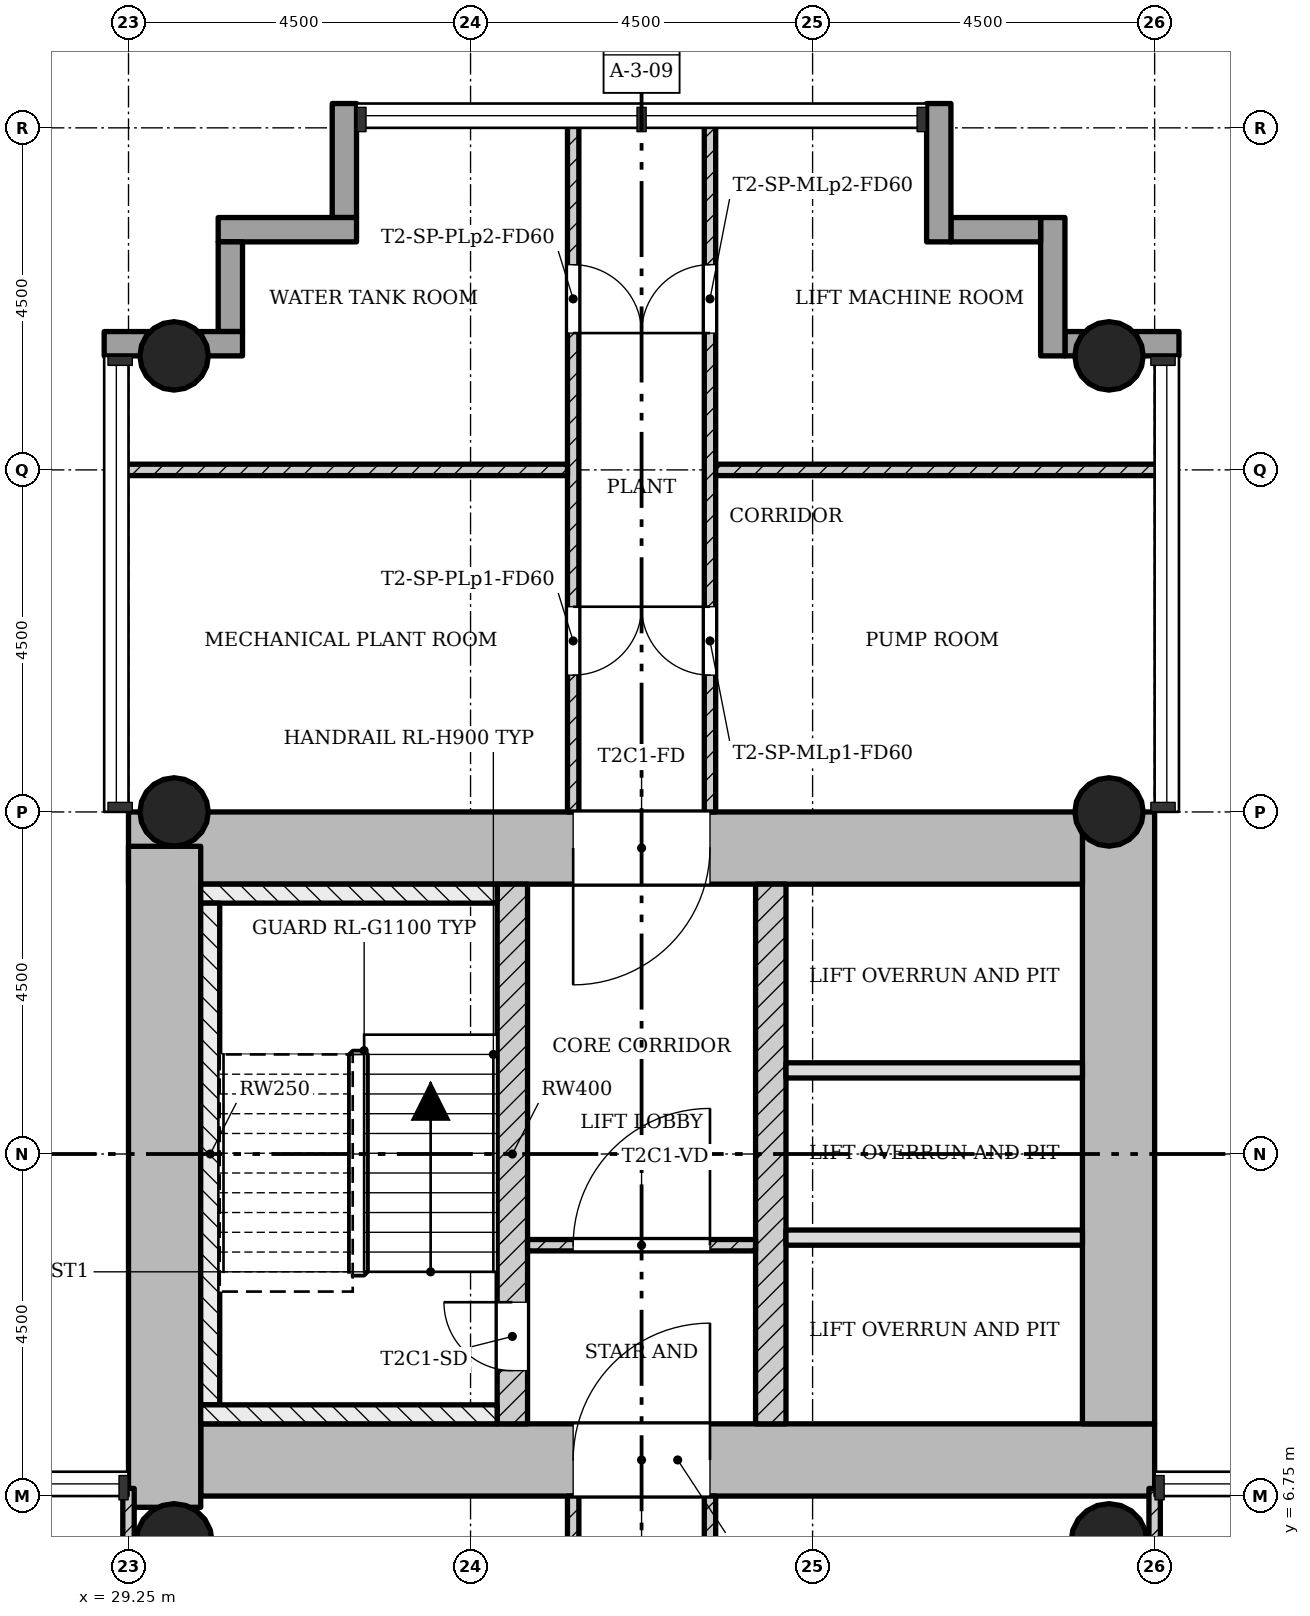
"""IFC4 building model, lengths in metres.
Left out: names, types, materials, properties, quantities, classifications, styles, units other than length and angle.
Written with IfcOpenShell. Run it as: python <this file> out.ifc"""

import sys

from ifc_helpers import new_model, si_unit, direction, frame, frame_2d, origin, origin_2d, place, context, subcontext, project, spatial, rectangle, hollow_circle, extrude, element, fill, save


model = new_model("IFC4")
c1 = context("Model", 3, precision=1e-05, world=origin(), true_north=direction((0.0, 1.0)))
c2 = subcontext(c1, "Body", "Model", "MODEL_VIEW")
j1 = project(units=[si_unit("LENGTHUNIT", "METRE"), si_unit("PLANEANGLEUNIT", "RADIAN")], contexts=[c1])
p1 = place(None, origin())
s1 = spatial("IfcSite", under=j1, at=p1, CompositionType="ELEMENT")
p2 = place(p1, origin())
s2 = spatial("IfcBuilding", under=s1, at=p2, CompositionType="ELEMENT")
p3 = place(p2, frame((0.0, 0.0, 124.2)))
s3 = spatial("IfcBuildingStorey", under=s2, at=p3, CompositionType="ELEMENT", Elevation=124.2)
p4 = place(p3, frame((30.2, 7.225, 0.0), z_axis=(0.0, 0.0, 1.0), x_axis=(1.0, 0.0, 0.0)))
e1 = element("IfcWall", 1, at=p4, inside=s3, PredefinedType="SHEAR", context=c2, shape_type="SweptSolid", body=[
    extrude(rectangle(XDim=12.55, YDim=0.95, at=frame_2d((6.275, 0.0))), origin(), (0.0, 0.0, 1.0), 4.5),
])
p5 = place(p4, frame((4.9, 0.0, 0.0)))
e2 = element("IfcOpeningElement", 2, at=p5, cuts=e1, PredefinedType="OPENING", context=c2, shape_type="SweptSolid", body=[
    extrude(rectangle(XDim=1.8, YDim=2.1, at=frame_2d((0.9, 1.05))), frame((0.0, 0.485, 0.0), z_axis=(0.0, -1.0, 0.0), x_axis=(1.0, 0.0, 0.0)), (0.0, 0.0, 1.0), 0.97),
])
p6 = place(p3, frame((42.275, 7.7, 0.0), z_axis=(0.0, 0.0, 1.0), x_axis=(0.0, 1.0, 0.0)))
e3 = element("IfcWall", 3, at=p6, inside=s3, PredefinedType="SHEAR", context=c2, shape_type="SweptSolid", body=[
    extrude(rectangle(XDim=8.05, YDim=0.95, at=frame_2d((4.025, 0.0))), origin(), (0.0, 0.0, 1.0), 4.5),
])
p7 = place(p3, frame((41.8, 15.275, 0.0), z_axis=(0.0, 0.0, 1.0), x_axis=(-1.0, 0.0, 0.0)))
e4 = element("IfcWall", 4, at=p7, inside=s3, PredefinedType="SHEAR", context=c2, shape_type="SweptSolid", body=[
    extrude(rectangle(XDim=12.55, YDim=0.95, at=frame_2d((6.275, 0.0))), origin(), (0.0, 0.0, 1.0), 4.5),
])
p8 = place(p7, frame((4.9, 0.0, 0.0)))
e5 = element("IfcOpeningElement", 5, at=p8, cuts=e4, PredefinedType="OPENING", context=c2, shape_type="SweptSolid", body=[
    extrude(rectangle(XDim=1.8, YDim=2.1, at=frame_2d((0.9, 1.05))), frame((0.0, 0.485, 0.0), z_axis=(0.0, -1.0, 0.0), x_axis=(1.0, 0.0, 0.0)), (0.0, 0.0, 1.0), 0.97),
])
p9 = place(p3, frame((29.725, 15.298, 0.0), z_axis=(0.0, 0.0, 1.0), x_axis=(0.0, -1.0, 0.0)))
e6 = element("IfcWall", 6, at=p9, inside=s3, PredefinedType="SHEAR", context=c2, shape_type="SweptSolid", body=[
    extrude(rectangle(XDim=8.696, YDim=0.95, at=frame_2d((4.348, 0.0))), origin(), (0.0, 0.0, 1.0), 4.5),
])
p10 = place(p3, frame((34.3, 7.7, 0.0), z_axis=(0.0, 0.0, 1.0), x_axis=(0.0, 1.0, 0.0)))
e7 = element("IfcWall", 7, at=p10, inside=s3, PredefinedType="SHEAR", context=c2, shape_type="SweptSolid", body=[
    extrude(rectangle(XDim=7.1, YDim=0.4, at=frame_2d((3.55, 0.0))), origin(), (0.0, 0.0, 1.0), 4.5),
])
p11 = place(p10, frame((0.7, 0.0, 0.0)))
e8 = element("IfcOpeningElement", 8, at=p11, cuts=e7, PredefinedType="OPENING", context=c2, shape_type="SweptSolid", body=[
    extrude(rectangle(XDim=0.9, YDim=2.1, at=frame_2d((0.45, 1.05))), frame((0.0, 0.21, 0.0), z_axis=(0.0, -1.0, 0.0), x_axis=(1.0, 0.0, 0.0)), (0.0, 0.0, 1.0), 0.42),
])
p12 = place(p3, frame((37.7, 7.7, 0.0), z_axis=(0.0, 0.0, 1.0), x_axis=(0.0, 1.0, 0.0)))
e9 = element("IfcWall", 9, at=p12, inside=s3, PredefinedType="SHEAR", context=c2, shape_type="SweptSolid", body=[
    extrude(rectangle(XDim=7.1, YDim=0.4, at=frame_2d((3.55, 0.0))), origin(), (0.0, 0.0, 1.0), 4.5),
])
for number, where, z_axis, x_axis in (
    (10, (42.15, 15.75, 0.0), (0.0, 0.0, 1.0), (1.0, 0.0, 0.0)),
    (11, (29.85, 15.75, 0.0), (0.0, 0.0, 1.0), (1.0, 0.0, 0.0)),
    (12, (42.15, 21.75, 0.0), (0.0, 0.0, 1.0), (1.0, 0.0, 0.0)),
    (13, (29.85, 21.75, 0.0), (0.0, 0.0, 1.0), (1.0, 0.0, 0.0)),
):
    element("IfcColumn", number, at=place(p3, frame(where, z_axis=z_axis, x_axis=x_axis)), inside=s3, PredefinedType="COLUMN", context=c2, shape_type="SweptSolid", body=[
        extrude(hollow_circle(Radius=0.45, WallThickness=0.032, at=origin_2d()), origin(), (0.0, 0.0, 1.0), 4.5),
    ])
for number, where, z_axis, x_axis in (
    (14, (42.15, 6.15, 0.0), (0.0, 0.0, 1.0), (1.0, 0.0, 0.0)),
    (15, (29.85, 6.15, 0.0), (0.0, 0.0, 1.0), (1.0, 0.0, 0.0)),
):
    element("IfcColumn", number, at=place(p3, frame(where, z_axis=z_axis, x_axis=x_axis)), inside=s3, PredefinedType="COLUMN", context=c2, shape_type="SweptSolid", body=[
        extrude(hollow_circle(Radius=0.5, WallThickness=0.036, at=origin_2d()), origin(), (0.0, 0.0, 1.0), 4.5),
    ])
p13 = place(p3, frame((43.07, 21.91, -0.3), z_axis=(0.0, 0.0, 1.0), x_axis=(-1.0, 0.0, 0.0)))
e16 = element("IfcWall", 16, at=p13, inside=s3, PredefinedType="STANDARD", context=c2, shape_type="SweptSolid", body=[
    extrude(rectangle(XDim=1.5, YDim=0.32, at=frame_2d((0.75, 0.0))), origin(), (0.0, 0.0, 1.0), 4.5),
])
p14 = place(p3, frame((41.41, 21.75, -0.3), z_axis=(0.0, 0.0, 1.0), x_axis=(0.0, 1.0, 0.0)))
e17 = element("IfcWall", 17, at=p14, inside=s3, PredefinedType="STANDARD", context=c2, shape_type="SweptSolid", body=[
    extrude(rectangle(XDim=1.82, YDim=0.32, at=frame_2d((0.91, 0.0))), origin(), (0.0, 0.0, 1.0), 4.5),
])
p15 = place(p3, frame((41.25, 23.41, -0.3), z_axis=(0.0, 0.0, 1.0), x_axis=(-1.0, 0.0, 0.0)))
e18 = element("IfcWall", 18, at=p15, inside=s3, PredefinedType="STANDARD", context=c2, shape_type="SweptSolid", body=[
    extrude(rectangle(XDim=1.18, YDim=0.32, at=frame_2d((0.59, 0.0))), origin(), (0.0, 0.0, 1.0), 4.5),
])
p16 = place(p3, frame((39.91, 23.25, -0.3), z_axis=(0.0, 0.0, 1.0), x_axis=(0.0, 1.0, 0.0)))
e19 = element("IfcWall", 19, at=p16, inside=s3, PredefinedType="STANDARD", context=c2, shape_type="SweptSolid", body=[
    extrude(rectangle(XDim=1.82, YDim=0.32, at=frame_2d((0.91, 0.0))), origin(), (0.0, 0.0, 1.0), 4.5),
])
p17 = place(p3, frame((32.09, 25.07, -0.3), z_axis=(0.0, 0.0, 1.0), x_axis=(0.0, -1.0, 0.0)))
e20 = element("IfcWall", 20, at=p17, inside=s3, PredefinedType="STANDARD", context=c2, shape_type="SweptSolid", body=[
    extrude(rectangle(XDim=1.5, YDim=0.32, at=frame_2d((0.75, 0.0))), origin(), (0.0, 0.0, 1.0), 4.5),
])
p18 = place(p3, frame((32.25, 23.41, -0.3), z_axis=(0.0, 0.0, 1.0), x_axis=(-1.0, 0.0, 0.0)))
e21 = element("IfcWall", 21, at=p18, inside=s3, PredefinedType="STANDARD", context=c2, shape_type="SweptSolid", body=[
    extrude(rectangle(XDim=1.82, YDim=0.32, at=frame_2d((0.91, 0.0))), origin(), (0.0, 0.0, 1.0), 4.5),
])
p19 = place(p3, frame((30.59, 23.25, -0.3), z_axis=(0.0, 0.0, 1.0), x_axis=(0.0, -1.0, 0.0)))
e22 = element("IfcWall", 22, at=p19, inside=s3, PredefinedType="STANDARD", context=c2, shape_type="SweptSolid", body=[
    extrude(rectangle(XDim=1.18, YDim=0.32, at=frame_2d((0.59, 0.0))), origin(), (0.0, 0.0, 1.0), 4.5),
])
p20 = place(p3, frame((30.75, 21.91, -0.3), z_axis=(0.0, 0.0, 1.0), x_axis=(-1.0, 0.0, 0.0)))
e23 = element("IfcWall", 23, at=p20, inside=s3, PredefinedType="STANDARD", context=c2, shape_type="SweptSolid", body=[
    extrude(rectangle(XDim=1.82, YDim=0.32, at=frame_2d((0.91, 0.0))), origin(), (0.0, 0.0, 1.0), 4.5),
])
p21 = place(p3, frame((37.5, 10.05, 0.0), z_axis=(0.0, 0.0, 1.0), x_axis=(-1.0, 0.0, 0.0)))
e24 = element("IfcWall", 24, at=p21, inside=s3, PredefinedType="PARTITIONING", context=c2, shape_type="SweptSolid", body=[
    extrude(rectangle(XDim=3.0, YDim=0.15, at=frame_2d((1.5, 0.0))), origin(), (0.0, 0.0, 1.0), 4.1),
])
p22 = place(p21, frame((0.6, 0.0, 0.0)))
e25 = element("IfcOpeningElement", 25, at=p22, cuts=e24, PredefinedType="OPENING", context=c2, shape_type="SweptSolid", body=[
    extrude(rectangle(XDim=1.8, YDim=2.1, at=frame_2d((0.9, 1.05))), frame((0.0, 0.085, 0.0), z_axis=(0.0, -1.0, 0.0), x_axis=(1.0, 0.0, 0.0)), (0.0, 0.0, 1.0), 0.17),
])
for number, where, z_axis, x_axis in (
    (26, (41.8, 10.15, 0.0), (0.0, 0.0, 1.0), (-1.0, 0.0, 0.0)),
    (27, (41.8, 12.35, 0.0), (0.0, 0.0, 1.0), (-1.0, 0.0, 0.0)),
):
    element("IfcWall", number, at=place(p3, frame(where, z_axis=z_axis, x_axis=x_axis)), inside=s3, PredefinedType="SOLIDWALL", context=c2, shape_type="SweptSolid", body=[
        extrude(rectangle(XDim=3.9, YDim=0.2, at=frame_2d((1.95, 0.0))), origin(), (0.0, 0.0, 1.0), 4.1),
    ])
p23 = place(p3, frame((35.1, 0.9, 0.0), z_axis=(0.0, 0.0, 1.0), x_axis=(0.0, 1.0, 0.0)))
e28 = element("IfcWall", 28, at=p23, inside=s3, PredefinedType="PARTITIONING", context=c2, shape_type="SweptSolid", body=[
    extrude(rectangle(XDim=5.85, YDim=0.15, at=frame_2d((2.925, 0.0))), origin(), (0.0, 0.0, 1.0), 4.1),
])
p24 = place(p23, frame((2.475, 0.0, 0.0)))
e29 = element("IfcOpeningElement", 29, at=p24, cuts=e28, PredefinedType="OPENING", context=c2, shape_type="SweptSolid", body=[
    extrude(rectangle(XDim=0.9, YDim=2.1, at=frame_2d((0.45, 1.05))), frame((0.0, 0.085, 0.0), z_axis=(0.0, -1.0, 0.0), x_axis=(1.0, 0.0, 0.0)), (0.0, 0.0, 1.0), 0.17),
])
p25 = place(p3, frame((36.9, 0.9, 0.0), z_axis=(0.0, 0.0, 1.0), x_axis=(0.0, 1.0, 0.0)))
e30 = element("IfcWall", 30, at=p25, inside=s3, PredefinedType="PARTITIONING", context=c2, shape_type="SweptSolid", body=[
    extrude(rectangle(XDim=5.85, YDim=0.15, at=frame_2d((2.925, 0.0))), origin(), (0.0, 0.0, 1.0), 4.1),
])
p26 = place(p25, frame((2.475, 0.0, 0.0)))
e31 = element("IfcOpeningElement", 31, at=p26, cuts=e30, PredefinedType="OPENING", context=c2, shape_type="SweptSolid", body=[
    extrude(rectangle(XDim=0.9, YDim=2.1, at=frame_2d((0.45, 1.05))), frame((0.0, 0.085, 0.0), z_axis=(0.0, -1.0, 0.0), x_axis=(1.0, 0.0, 0.0)), (0.0, 0.0, 1.0), 0.17),
])
p27 = place(p3, frame((35.1, 15.75, 0.0), z_axis=(0.0, 0.0, 1.0), x_axis=(0.0, 1.0, 0.0)))
e32 = element("IfcWall", 32, at=p27, inside=s3, PredefinedType="PARTITIONING", context=c2, shape_type="SweptSolid", body=[
    extrude(rectangle(XDim=9.1, YDim=0.15, at=frame_2d((4.55, 0.0))), origin(), (0.0, 0.0, 1.0), 4.1),
])
p28 = place(p27, frame((1.8, 0.0, 0.0)))
e33 = element("IfcOpeningElement", 33, at=p28, cuts=e32, PredefinedType="OPENING", context=c2, shape_type="SweptSolid", body=[
    extrude(rectangle(XDim=0.9, YDim=2.1, at=frame_2d((0.45, 1.05))), frame((0.0, 0.085, 0.0), z_axis=(0.0, -1.0, 0.0), x_axis=(1.0, 0.0, 0.0)), (0.0, 0.0, 1.0), 0.17),
])
p29 = place(p27, frame((6.3, 0.0, 0.0)))
e34 = element("IfcOpeningElement", 34, at=p29, cuts=e32, PredefinedType="OPENING", context=c2, shape_type="SweptSolid", body=[
    extrude(rectangle(XDim=0.9, YDim=2.1, at=frame_2d((0.45, 1.05))), frame((0.0, 0.085, 0.0), z_axis=(0.0, -1.0, 0.0), x_axis=(1.0, 0.0, 0.0)), (0.0, 0.0, 1.0), 0.17),
])
p30 = place(p3, frame((35.025, 20.25, 0.0), z_axis=(0.0, 0.0, 1.0), x_axis=(-1.0, 0.0, 0.0)))
e35 = element("IfcWall", 35, at=p30, inside=s3, PredefinedType="PARTITIONING", context=c2, shape_type="SweptSolid", body=[
    extrude(rectangle(XDim=5.875, YDim=0.15, at=frame_2d((2.938, 0.0))), origin(), (0.0, 0.0, 1.0), 4.1),
])
p31 = place(p3, frame((36.9, 15.75, 0.0), z_axis=(0.0, 0.0, 1.0), x_axis=(0.0, 1.0, 0.0)))
e36 = element("IfcWall", 36, at=p31, inside=s3, PredefinedType="PARTITIONING", context=c2, shape_type="SweptSolid", body=[
    extrude(rectangle(XDim=9.1, YDim=0.15, at=frame_2d((4.55, 0.0))), origin(), (0.0, 0.0, 1.0), 4.1),
])
p32 = place(p31, frame((1.8, 0.0, 0.0)))
e37 = element("IfcOpeningElement", 37, at=p32, cuts=e36, PredefinedType="OPENING", context=c2, shape_type="SweptSolid", body=[
    extrude(rectangle(XDim=0.9, YDim=2.1, at=frame_2d((0.45, 1.05))), frame((0.0, 0.085, 0.0), z_axis=(0.0, -1.0, 0.0), x_axis=(1.0, 0.0, 0.0)), (0.0, 0.0, 1.0), 0.17),
])
p33 = place(p31, frame((6.3, 0.0, 0.0)))
e38 = element("IfcOpeningElement", 38, at=p33, cuts=e36, PredefinedType="OPENING", context=c2, shape_type="SweptSolid", body=[
    extrude(rectangle(XDim=0.9, YDim=2.1, at=frame_2d((0.45, 1.05))), frame((0.0, 0.085, 0.0), z_axis=(0.0, -1.0, 0.0), x_axis=(1.0, 0.0, 0.0)), (0.0, 0.0, 1.0), 0.17),
])
p34 = place(p3, frame((36.975, 20.25, 0.0), z_axis=(0.0, 0.0, 1.0), x_axis=(1.0, 0.0, 0.0)))
e39 = element("IfcWall", 39, at=p34, inside=s3, PredefinedType="PARTITIONING", context=c2, shape_type="SweptSolid", body=[
    extrude(rectangle(XDim=5.875, YDim=0.15, at=frame_2d((2.938, 0.0))), origin(), (0.0, 0.0, 1.0), 4.1),
])
p35 = place(p3, frame((29.25, -6.85, 0.0), z_axis=(0.0, 0.0, 1.0), x_axis=(0.0, 1.0, 0.0)))
e40 = element("IfcWall", 40, at=p35, inside=s3, PredefinedType="PARTITIONING", context=c2, shape_type="SweptSolid", body=[
    extrude(rectangle(XDim=13.7, YDim=0.15, at=frame_2d((6.85, 0.0))), origin(), (0.0, 0.0, 1.0), 4.1),
])
p36 = place(p35, frame((5.95, 0.0, 0.0)))
e41 = element("IfcOpeningElement", 41, at=p36, cuts=e40, PredefinedType="OPENING", context=c2, shape_type="SweptSolid", body=[
    extrude(rectangle(XDim=1.8, YDim=2.1, at=frame_2d((0.9, 1.05))), frame((0.0, 0.085, 0.0), z_axis=(0.0, -1.0, 0.0), x_axis=(1.0, 0.0, 0.0)), (0.0, 0.0, 1.0), 0.17),
])
p37 = place(p3, frame((42.75, -6.85, 0.0), z_axis=(0.0, 0.0, 1.0), x_axis=(0.0, 1.0, 0.0)))
e42 = element("IfcWall", 42, at=p37, inside=s3, PredefinedType="PARTITIONING", context=c2, shape_type="SweptSolid", body=[
    extrude(rectangle(XDim=13.7, YDim=0.15, at=frame_2d((6.85, 0.0))), origin(), (0.0, 0.0, 1.0), 4.1),
])
p38 = place(p37, frame((5.95, 0.0, 0.0)))
e43 = element("IfcOpeningElement", 43, at=p38, cuts=e42, PredefinedType="OPENING", context=c2, shape_type="SweptSolid", body=[
    extrude(rectangle(XDim=1.8, YDim=2.1, at=frame_2d((0.9, 1.05))), frame((0.0, 0.085, 0.0), z_axis=(0.0, -1.0, 0.0), x_axis=(1.0, 0.0, 0.0)), (0.0, 0.0, 1.0), 0.17),
])
p39 = place(p3, frame((34.1, 14.675, 0.0), z_axis=(0.0, 0.0, 1.0), x_axis=(-1.0, 0.0, 0.0)))
e44 = element("IfcWall", 44, at=p39, inside=s3, PredefinedType="SHEAR", context=c2, shape_type="SweptSolid", body=[
    extrude(rectangle(XDim=3.9, YDim=0.25, at=frame_2d((1.95, 0.0))), origin(), (0.0, 0.0, 1.0), 4.5),
])
p40 = place(p3, frame((30.325, 7.95, 0.0), z_axis=(0.0, 0.0, 1.0), x_axis=(0.0, 1.0, 0.0)))
e45 = element("IfcWall", 45, at=p40, inside=s3, PredefinedType="SHEAR", context=c2, shape_type="SweptSolid", body=[
    extrude(rectangle(XDim=6.6, YDim=0.25, at=frame_2d((3.3, 0.0))), origin(), (0.0, 0.0, 1.0), 4.5),
])
p41 = place(p3, frame((34.1, 7.825, 0.0), z_axis=(0.0, 0.0, 1.0), x_axis=(-1.0, 0.0, 0.0)))
e46 = element("IfcWall", 46, at=p41, inside=s3, PredefinedType="SHEAR", context=c2, shape_type="SweptSolid", body=[
    extrude(rectangle(XDim=3.9, YDim=0.25, at=frame_2d((1.95, 0.0))), origin(), (0.0, 0.0, 1.0), 4.5),
])
p42 = place(p22, origin())
e47 = element("IfcDoor", 47, at=p42, inside=s3, OperationType="SINGLE_SWING_LEFT", PredefinedType="DOOR", context=c2, shape_type="SweptSolid", body=[
    extrude(rectangle(XDim=1.8, YDim=2.1, at=frame_2d((0.9, 1.05))), frame((0.0, 0.025, 0.0), z_axis=(0.0, -1.0, 0.0), x_axis=(1.0, 0.0, 0.0)), (0.0, 0.0, 1.0), 0.05),
])
fill(e25, e47)
p43 = place(p28, origin())
e48 = element("IfcDoor", 48, at=p43, inside=s3, OperationType="SINGLE_SWING_RIGHT", PredefinedType="DOOR", context=c2, shape_type="SweptSolid", body=[
    extrude(rectangle(XDim=0.9, YDim=2.1, at=frame_2d((0.45, 1.05))), frame((0.0, 0.025, 0.0), z_axis=(0.0, -1.0, 0.0), x_axis=(1.0, 0.0, 0.0)), (0.0, 0.0, 1.0), 0.05),
])
fill(e33, e48)
p44 = place(p29, origin())
e49 = element("IfcDoor", 49, at=p44, inside=s3, OperationType="SINGLE_SWING_LEFT", PredefinedType="DOOR", context=c2, shape_type="SweptSolid", body=[
    extrude(rectangle(XDim=0.9, YDim=2.1, at=frame_2d((0.45, 1.05))), frame((0.0, 0.025, 0.0), z_axis=(0.0, -1.0, 0.0), x_axis=(1.0, 0.0, 0.0)), (0.0, 0.0, 1.0), 0.05),
])
fill(e34, e49)
p45 = place(p32, origin())
e50 = element("IfcDoor", 50, at=p45, inside=s3, OperationType="SINGLE_SWING_LEFT", PredefinedType="DOOR", context=c2, shape_type="SweptSolid", body=[
    extrude(rectangle(XDim=0.9, YDim=2.1, at=frame_2d((0.45, 1.05))), frame((0.0, 0.025, 0.0), z_axis=(0.0, -1.0, 0.0), x_axis=(1.0, 0.0, 0.0)), (0.0, 0.0, 1.0), 0.05),
])
fill(e37, e50)
p46 = place(p33, origin())
e51 = element("IfcDoor", 51, at=p46, inside=s3, OperationType="SINGLE_SWING_RIGHT", PredefinedType="DOOR", context=c2, shape_type="SweptSolid", body=[
    extrude(rectangle(XDim=0.9, YDim=2.1, at=frame_2d((0.45, 1.05))), frame((0.0, 0.025, 0.0), z_axis=(0.0, -1.0, 0.0), x_axis=(1.0, 0.0, 0.0)), (0.0, 0.0, 1.0), 0.05),
])
fill(e38, e51)
p47 = place(p11, origin())
e52 = element("IfcDoor", 52, at=p47, inside=s3, OperationType="SINGLE_SWING_LEFT", PredefinedType="DOOR", context=c2, shape_type="SweptSolid", body=[
    extrude(rectangle(XDim=0.9, YDim=2.1, at=frame_2d((0.45, 1.05))), frame((0.0, 0.025, 0.0), z_axis=(0.0, -1.0, 0.0), x_axis=(1.0, 0.0, 0.0)), (0.0, 0.0, 1.0), 0.05),
])
fill(e8, e52)
p48 = place(p5, origin())
e53 = element("IfcDoor", 53, at=p48, inside=s3, OperationType="SINGLE_SWING_LEFT", PredefinedType="DOOR", context=c2, shape_type="SweptSolid", body=[
    extrude(rectangle(XDim=1.8, YDim=2.1, at=frame_2d((0.9, 1.05))), frame((0.0, 0.025, 0.0), z_axis=(0.0, -1.0, 0.0), x_axis=(1.0, 0.0, 0.0)), (0.0, 0.0, 1.0), 0.05),
])
fill(e2, e53)
p49 = place(p8, origin())
e54 = element("IfcDoor", 54, at=p49, inside=s3, OperationType="SINGLE_SWING_LEFT", PredefinedType="DOOR", context=c2, shape_type="SweptSolid", body=[
    extrude(rectangle(XDim=1.8, YDim=2.1, at=frame_2d((0.9, 1.05))), frame((0.0, 0.025, 0.0), z_axis=(0.0, -1.0, 0.0), x_axis=(1.0, 0.0, 0.0)), (0.0, 0.0, 1.0), 0.05),
])
fill(e5, e54)
save(model, sys.argv[1])
